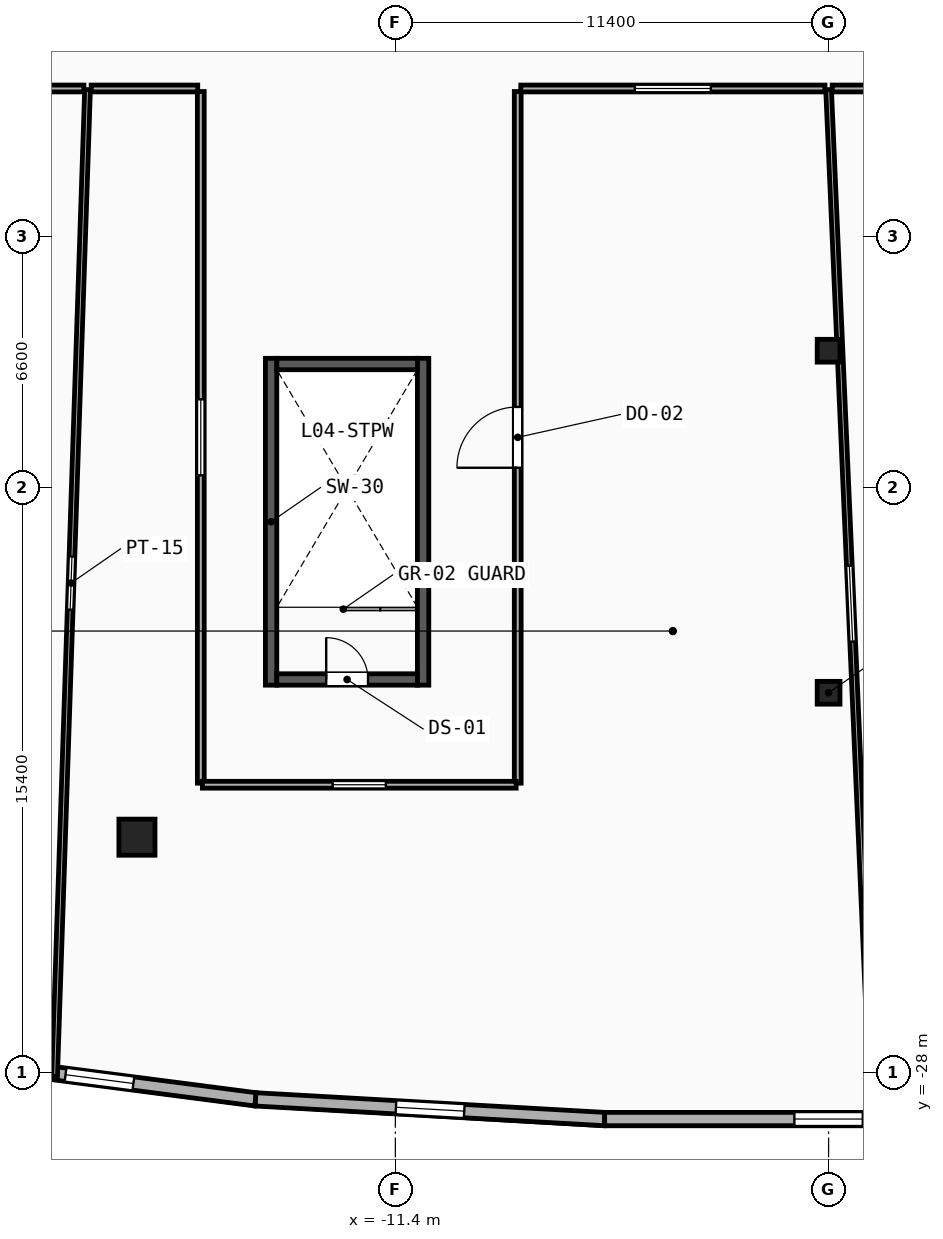
"""IFC4 building model, lengths in metres.
Left out: names, types, materials, properties, quantities, classifications, styles, units other than length and angle.
Written with IfcOpenShell. Run it as: python <this file> out.ifc"""

import sys

from ifc_helpers import new_model, si_unit, direction, frame, frame_2d, origin, origin_2d, place, context, subcontext, project, spatial, rectangle, hollow_rectangle, circle, extrude, element, fill, save


model = new_model("IFC4")
c1 = context("Model", 3, precision=1e-05, world=origin(), true_north=direction((0.0, 1.0)))
c2 = subcontext(c1, "Body", "Model", "MODEL_VIEW")
j1 = project(units=[si_unit("LENGTHUNIT", "METRE"), si_unit("PLANEANGLEUNIT", "RADIAN")], contexts=[c1])
p1 = place(None, origin())
s1 = spatial("IfcSite", under=j1, at=p1, CompositionType="ELEMENT")
p2 = place(p1, origin())
s2 = spatial("IfcBuilding", under=s1, at=p2, CompositionType="ELEMENT")
p3 = place(p2, frame((0.0, 0.0, 20.0)))
s3 = spatial("IfcBuildingStorey", under=s2, at=p3, CompositionType="ELEMENT", Elevation=20.0)
for number, where, z_axis, x_axis in (
    (1, (0.0, -18.0, 0.0), (0.0, 0.0, 1.0), (1.0, 0.0, 0.0)),
    (2, (0.0, -9.0, 0.0), (0.0, 0.0, 1.0), (1.0, 0.0, 0.0)),
):
    element("IfcColumn", number, at=place(p3, frame(where, z_axis=z_axis, x_axis=x_axis)), inside=s3, PredefinedType="COLUMN", context=c2, shape_type="SweptSolid", body=[
        extrude(hollow_rectangle(XDim=0.6, YDim=0.6, WallThickness=0.032, at=origin_2d()), origin(), (0.0, 0.0, 1.0), 3.695),
    ])
p4 = place(p3, frame((-18.2, -21.8, 0.0), z_axis=(0.0, 0.0, 1.0), x_axis=(1.0, 0.0, 0.0)))
e3 = element("IfcColumn", 3, at=p4, inside=s3, PredefinedType="PILASTER", context=c2, shape_type="SweptSolid", body=[
    extrude(circle(Radius=0.475, at=origin_2d()), origin(), (0.0, 0.0, 1.0), 3.695),
])
p5 = place(p3, frame((-23.293, -27.632, 0.0), z_axis=(0.0, 0.0, 1.0), x_axis=(0.99168663472, -0.128676410104, 0.0)))
e4 = element("IfcWall", 4, at=p5, inside=s3, PredefinedType="SOLIDWALL", context=c2, shape_type="SweptSolid", body=[
    extrude(rectangle(XDim=8.284, YDim=0.35, at=frame_2d((4.142, 0.0))), origin(), (0.0, 0.0, 1.0), 3.7),
])
p6 = place(p5, frame((3.242, 0.0, 0.45)))
e5 = element("IfcOpeningElement", 5, at=p6, cuts=e4, PredefinedType="OPENING", context=c2, shape_type="SweptSolid", body=[
    extrude(rectangle(XDim=1.8, YDim=2.4, at=frame_2d((0.9, 1.2))), frame((0.0, 0.185, 0.0), z_axis=(0.0, -1.0, 0.0), x_axis=(1.0, 0.0, 0.0)), (0.0, 0.0, 1.0), 0.37),
])
p7 = place(p3, frame((-15.079, -28.698, 0.0), z_axis=(0.0, 0.0, 1.0), x_axis=(0.998413463137, -0.056307695976, 0.0)))
e6 = element("IfcWall", 6, at=p7, inside=s3, PredefinedType="SOLIDWALL", context=c2, shape_type="SweptSolid", body=[
    extrude(rectangle(XDim=9.201, YDim=0.35, at=frame_2d((4.6, 0.0))), origin(), (0.0, 0.0, 1.0), 3.7),
])
p8 = place(p7, frame((3.7, 0.0, 0.45)))
e7 = element("IfcOpeningElement", 7, at=p8, cuts=e6, PredefinedType="OPENING", context=c2, shape_type="SweptSolid", body=[
    extrude(rectangle(XDim=1.8, YDim=2.4, at=frame_2d((0.9, 1.2))), frame((0.0, 0.185, 0.0), z_axis=(0.0, -1.0, 0.0), x_axis=(1.0, 0.0, 0.0)), (0.0, 0.0, 1.0), 0.37),
])
p9 = place(p3, frame((-5.893, -29.216, 0.0), z_axis=(0.0, 0.0, 1.0), x_axis=(1.0, 0.0, 0.0)))
e8 = element("IfcWall", 8, at=p9, inside=s3, PredefinedType="SOLIDWALL", context=c2, shape_type="SweptSolid", body=[
    extrude(rectangle(XDim=11.785, YDim=0.35, at=frame_2d((5.893, 0.0))), origin(), (0.0, 0.0, 1.0), 3.7),
])
p10 = place(p9, frame((4.992, 0.0, 0.45)))
e9 = element("IfcOpeningElement", 9, at=p10, cuts=e8, PredefinedType="OPENING", context=c2, shape_type="SweptSolid", body=[
    extrude(rectangle(XDim=1.8, YDim=2.4, at=frame_2d((0.9, 1.2))), frame((0.0, 0.185, 0.0), z_axis=(0.0, -1.0, 0.0), x_axis=(1.0, 0.0, 0.0)), (0.0, 0.0, 1.0), 0.37),
])
for number, where, z_axis, x_axis in (
    (10, (-14.67, -17.8, 0.0), (0.0, 0.0, 1.0), (0.0, 1.0, 0.0)),
    (11, (-10.67, -17.8, 0.0), (0.0, 0.0, 1.0), (0.0, 1.0, 0.0)),
):
    element("IfcWall", number, at=place(p3, frame(where, z_axis=z_axis, x_axis=x_axis)), inside=s3, PredefinedType="SHEAR", context=c2, shape_type="SweptSolid", body=[
        extrude(rectangle(XDim=8.6, YDim=0.3, at=frame_2d((4.3, 0.0))), origin(), (0.0, 0.0, 1.0), 3.7),
    ])
p11 = place(p3, frame((-14.52, -17.65, 0.0), z_axis=(0.0, 0.0, 1.0), x_axis=(1.0, 0.0, 0.0)))
e12 = element("IfcWall", 12, at=p11, inside=s3, PredefinedType="SHEAR", context=c2, shape_type="SweptSolid", body=[
    extrude(rectangle(XDim=3.7, YDim=0.3, at=frame_2d((1.85, 0.0))), origin(), (0.0, 0.0, 1.0), 3.7),
])
p12 = place(p11, frame((1.3, 0.0, 0.0)))
e13 = element("IfcOpeningElement", 13, at=p12, cuts=e12, PredefinedType="OPENING", context=c2, shape_type="SweptSolid", body=[
    extrude(rectangle(XDim=1.1, YDim=2.15, at=frame_2d((0.55, 1.075))), frame((0.0, 0.16, 0.0), z_axis=(0.0, -1.0, 0.0), x_axis=(1.0, 0.0, 0.0)), (0.0, 0.0, 1.0), 0.32),
])
p13 = place(p3, frame((-14.52, -9.35, 0.0), z_axis=(0.0, 0.0, 1.0), x_axis=(1.0, 0.0, 0.0)))
e14 = element("IfcWall", 14, at=p13, inside=s3, PredefinedType="SHEAR", context=c2, shape_type="SweptSolid", body=[
    extrude(rectangle(XDim=3.7, YDim=0.3, at=frame_2d((1.85, 0.0))), origin(), (0.0, 0.0, 1.0), 3.7),
])
p14 = place(p3, frame((-20.367, -28.098, 0.0), z_axis=(0.0, 0.0, 1.0), x_axis=(0.033375525231, 0.999442881968, 0.0)))
e15 = element("IfcWall", 15, at=p14, inside=s3, PredefinedType="PARTITIONING", context=c2, shape_type="SweptSolid", body=[
    extrude(rectangle(XDim=25.983, YDim=0.15, at=frame_2d((12.991, 0.0))), origin(), (0.0, 0.0, 1.0), 3.7),
])
p15 = place(p14, frame((12.291, 0.0, 1.05)))
e16 = element("IfcOpeningElement", 16, at=p15, cuts=e15, PredefinedType="OPENING", context=c2, shape_type="SweptSolid", body=[
    extrude(rectangle(XDim=1.4, YDim=1.5, at=frame_2d((0.7, 0.75))), frame((0.0, 0.085, 0.0), z_axis=(0.0, -1.0, 0.0), x_axis=(1.0, 0.0, 0.0)), (0.0, 0.0, 1.0), 0.17),
])
p16 = place(p3, frame((1.179, -29.18, 0.0), z_axis=(0.0, 0.0, 1.0), x_axis=(-0.043560875221, 0.999050774561, 0.0)))
e17 = element("IfcWall", 17, at=p16, inside=s3, PredefinedType="PARTITIONING", context=c2, shape_type="SweptSolid", body=[
    extrude(rectangle(XDim=27.076, YDim=0.15, at=frame_2d((13.538, 0.0))), origin(), (0.0, 0.0, 1.0), 2.922),
])
p17 = place(p16, frame((12.538, 0.0, 1.05)))
e18 = element("IfcOpeningElement", 18, at=p17, cuts=e17, PredefinedType="OPENING", context=c2, shape_type="SweptSolid", body=[
    extrude(rectangle(XDim=2.0, YDim=1.5, at=frame_2d((1.0, 0.75))), frame((0.0, 0.085, 0.0), z_axis=(0.0, -1.0, 0.0), x_axis=(1.0, 0.0, 0.0)), (0.0, 0.0, 1.0), 0.17),
])
p18 = place(p3, frame((-8.18, -20.378, 0.0), z_axis=(0.0, 0.0, 1.0), x_axis=(0.0, 1.0, 0.0)))
e19 = element("IfcWall", 19, at=p18, inside=s3, PredefinedType="PARTITIONING", context=c2, shape_type="SweptSolid", body=[
    extrude(rectangle(XDim=18.198, YDim=0.18, at=frame_2d((9.099, 0.0))), origin(), (0.0, 0.0, 1.0), 3.7),
])
p19 = place(p18, frame((8.299, 0.0, 0.0)))
e20 = element("IfcOpeningElement", 20, at=p19, cuts=e19, PredefinedType="OPENING", context=c2, shape_type="SweptSolid", body=[
    extrude(rectangle(XDim=1.6, YDim=2.2, at=frame_2d((0.8, 1.1))), frame((0.0, 0.1, 0.0), z_axis=(0.0, -1.0, 0.0), x_axis=(1.0, 0.0, 0.0)), (0.0, 0.0, 1.0), 0.2),
])
p20 = place(p3, frame((-16.52, -2.18, 0.0), z_axis=(0.0, 0.0, 1.0), x_axis=(0.0, -1.0, 0.0)))
e21 = element("IfcWall", 21, at=p20, inside=s3, PredefinedType="PARTITIONING", context=c2, shape_type="SweptSolid", body=[
    extrude(rectangle(XDim=18.198, YDim=0.18, at=frame_2d((9.099, 0.0))), origin(), (0.0, 0.0, 1.0), 3.7),
])
p21 = place(p20, frame((8.099, 0.0, 1.05)))
e22 = element("IfcOpeningElement", 22, at=p21, cuts=e21, PredefinedType="OPENING", context=c2, shape_type="SweptSolid", body=[
    extrude(rectangle(XDim=2.0, YDim=1.5, at=frame_2d((1.0, 0.75))), frame((0.0, 0.1, 0.0), z_axis=(0.0, -1.0, 0.0), x_axis=(1.0, 0.0, 0.0)), (0.0, 0.0, 1.0), 0.2),
])
p22 = place(p3, frame((-16.479, -20.42, 0.0), z_axis=(0.0, 0.0, 1.0), x_axis=(1.0, 0.0, 0.0)))
e23 = element("IfcWall", 23, at=p22, inside=s3, PredefinedType="PARTITIONING", context=c2, shape_type="SweptSolid", body=[
    extrude(rectangle(XDim=8.257, YDim=0.18, at=frame_2d((4.128, 0.0))), origin(), (0.0, 0.0, 1.0), 3.7),
])
p23 = place(p22, frame((3.428, 0.0, 1.05)))
e24 = element("IfcOpeningElement", 24, at=p23, cuts=e23, PredefinedType="OPENING", context=c2, shape_type="SweptSolid", body=[
    extrude(rectangle(XDim=1.4, YDim=1.5, at=frame_2d((0.7, 0.75))), frame((0.0, 0.1, 0.0), z_axis=(0.0, -1.0, 0.0), x_axis=(1.0, 0.0, 0.0)), (0.0, 0.0, 1.0), 0.2),
])
p24 = place(p3, frame((-8.1, -2.1, 0.0), z_axis=(0.0, 0.0, 1.0), x_axis=(1.0, 0.0, 0.0)))
e25 = element("IfcWall", 25, at=p24, inside=s3, PredefinedType="PARTITIONING", context=c2, shape_type="SweptSolid", body=[
    extrude(rectangle(XDim=8.005, YDim=0.18, at=frame_2d((4.002, 0.0))), origin(), (0.0, 0.0, 1.0), 3.7),
])
p25 = place(p24, frame((3.002, 0.0, 1.05)))
e26 = element("IfcOpeningElement", 26, at=p25, cuts=e25, PredefinedType="OPENING", context=c2, shape_type="SweptSolid", body=[
    extrude(rectangle(XDim=2.0, YDim=1.5, at=frame_2d((1.0, 0.75))), frame((0.0, 0.1, 0.0), z_axis=(0.0, -1.0, 0.0), x_axis=(1.0, 0.0, 0.0)), (0.0, 0.0, 1.0), 0.2),
])
p26 = place(p3, frame((-19.405, -2.1, 0.0), z_axis=(0.0, 0.0, 1.0), x_axis=(1.0, 0.0, 0.0)))
e27 = element("IfcWall", 27, at=p26, inside=s3, PredefinedType="PARTITIONING", context=c2, shape_type="SweptSolid", body=[
    extrude(rectangle(XDim=2.805, YDim=0.18, at=frame_2d((1.402, 0.0))), origin(), (0.0, 0.0, 1.0), 3.7),
])
p27 = place(p3, frame((0.095, -2.1, 0.0), z_axis=(0.0, 0.0, 1.0), x_axis=(1.0, 0.0, 0.0)))
e28 = element("IfcWall", 28, at=p27, inside=s3, PredefinedType="PARTITIONING", context=c2, shape_type="SweptSolid", body=[
    extrude(rectangle(XDim=16.945, YDim=0.18, at=frame_2d((8.473, 0.0))), origin(), (0.0, 0.0, 1.0), 2.922),
])
p28 = place(p27, frame((7.673, 0.0, 0.0)))
e29 = element("IfcOpeningElement", 29, at=p28, cuts=e28, PredefinedType="OPENING", context=c2, shape_type="SweptSolid", body=[
    extrude(rectangle(XDim=1.6, YDim=2.2, at=frame_2d((0.8, 1.1))), frame((0.0, 0.1, 0.0), z_axis=(0.0, -1.0, 0.0), x_axis=(1.0, 0.0, 0.0)), (0.0, 0.0, 1.0), 0.2),
])
p29 = place(p3, frame((-35.479, -2.1, 0.0), z_axis=(0.0, 0.0, 1.0), x_axis=(1.0, 0.0, 0.0)))
e30 = element("IfcWall", 30, at=p29, inside=s3, PredefinedType="PARTITIONING", context=c2, shape_type="SweptSolid", body=[
    extrude(rectangle(XDim=15.884, YDim=0.18, at=frame_2d((7.942, 0.0))), origin(), (0.0, 0.0, 1.0), 3.7),
])
p30 = place(p29, frame((7.142, 0.0, 0.0)))
e31 = element("IfcOpeningElement", 31, at=p30, cuts=e30, PredefinedType="OPENING", context=c2, shape_type="SweptSolid", body=[
    extrude(rectangle(XDim=1.6, YDim=2.2, at=frame_2d((0.8, 1.1))), frame((0.0, 0.1, 0.0), z_axis=(0.0, -1.0, 0.0), x_axis=(1.0, 0.0, 0.0)), (0.0, 0.0, 1.0), 0.2),
])
p31 = place(p6, origin())
e32 = element("IfcWindow", 32, at=p31, inside=s3, PartitioningType="SINGLE_PANEL", PredefinedType="WINDOW", context=c2, shape_type="SweptSolid", body=[
    extrude(rectangle(XDim=1.8, YDim=2.4, at=frame_2d((0.9, 1.2))), frame((0.0, 0.03, 0.0), z_axis=(0.0, -1.0, 0.0), x_axis=(1.0, 0.0, 0.0)), (0.0, 0.0, 1.0), 0.06),
])
fill(e5, e32)
p32 = place(p8, origin())
e33 = element("IfcWindow", 33, at=p32, inside=s3, PartitioningType="SINGLE_PANEL", PredefinedType="WINDOW", context=c2, shape_type="SweptSolid", body=[
    extrude(rectangle(XDim=1.8, YDim=2.4, at=frame_2d((0.9, 1.2))), frame((0.0, 0.03, 0.0), z_axis=(0.0, -1.0, 0.0), x_axis=(1.0, 0.0, 0.0)), (0.0, 0.0, 1.0), 0.06),
])
fill(e7, e33)
p33 = place(p10, origin())
e34 = element("IfcWindow", 34, at=p33, inside=s3, PartitioningType="SINGLE_PANEL", PredefinedType="WINDOW", context=c2, shape_type="SweptSolid", body=[
    extrude(rectangle(XDim=1.8, YDim=2.4, at=frame_2d((0.9, 1.2))), frame((0.0, 0.03, 0.0), z_axis=(0.0, -1.0, 0.0), x_axis=(1.0, 0.0, 0.0)), (0.0, 0.0, 1.0), 0.06),
])
fill(e9, e34)
p34 = place(p12, origin())
e35 = element("IfcDoor", 35, at=p34, inside=s3, OperationType="SINGLE_SWING_LEFT", PredefinedType="DOOR", context=c2, shape_type="SweptSolid", body=[
    extrude(rectangle(XDim=1.1, YDim=2.15, at=frame_2d((0.55, 1.075))), frame((0.0, 0.025, 0.0), z_axis=(0.0, -1.0, 0.0), x_axis=(1.0, 0.0, 0.0)), (0.0, 0.0, 1.0), 0.05),
])
fill(e13, e35)
p35 = place(p19, origin())
e36 = element("IfcDoor", 36, at=p35, inside=s3, OperationType="SINGLE_SWING_LEFT", PredefinedType="DOOR", context=c2, shape_type="SweptSolid", body=[
    extrude(rectangle(XDim=1.6, YDim=2.2, at=frame_2d((0.8, 1.1))), frame((0.0, 0.025, 0.0), z_axis=(0.0, -1.0, 0.0), x_axis=(1.0, 0.0, 0.0)), (0.0, 0.0, 1.0), 0.05),
])
fill(e20, e36)
p36 = place(p15, origin())
e37 = element("IfcWindow", 37, at=p36, inside=s3, PartitioningType="SINGLE_PANEL", PredefinedType="WINDOW", context=c2, shape_type="SweptSolid", body=[
    extrude(rectangle(XDim=1.4, YDim=1.5, at=frame_2d((0.7, 0.75))), frame((0.0, 0.03, 0.0), z_axis=(0.0, -1.0, 0.0), x_axis=(1.0, 0.0, 0.0)), (0.0, 0.0, 1.0), 0.06),
])
fill(e16, e37)
p37 = place(p17, origin())
e38 = element("IfcWindow", 38, at=p37, inside=s3, PartitioningType="SINGLE_PANEL", PredefinedType="WINDOW", context=c2, shape_type="SweptSolid", body=[
    extrude(rectangle(XDim=2.0, YDim=1.5, at=frame_2d((1.0, 0.75))), frame((0.0, 0.03, 0.0), z_axis=(0.0, -1.0, 0.0), x_axis=(1.0, 0.0, 0.0)), (0.0, 0.0, 1.0), 0.06),
])
fill(e18, e38)
p38 = place(p21, origin())
e39 = element("IfcWindow", 39, at=p38, inside=s3, PartitioningType="SINGLE_PANEL", PredefinedType="WINDOW", context=c2, shape_type="SweptSolid", body=[
    extrude(rectangle(XDim=2.0, YDim=1.5, at=frame_2d((1.0, 0.75))), frame((0.0, 0.03, 0.0), z_axis=(0.0, -1.0, 0.0), x_axis=(1.0, 0.0, 0.0)), (0.0, 0.0, 1.0), 0.06),
])
fill(e22, e39)
p39 = place(p23, origin())
e40 = element("IfcWindow", 40, at=p39, inside=s3, PartitioningType="SINGLE_PANEL", PredefinedType="WINDOW", context=c2, shape_type="SweptSolid", body=[
    extrude(rectangle(XDim=1.4, YDim=1.5, at=frame_2d((0.7, 0.75))), frame((0.0, 0.03, 0.0), z_axis=(0.0, -1.0, 0.0), x_axis=(1.0, 0.0, 0.0)), (0.0, 0.0, 1.0), 0.06),
])
fill(e24, e40)
p40 = place(p25, origin())
e41 = element("IfcWindow", 41, at=p40, inside=s3, PartitioningType="SINGLE_PANEL", PredefinedType="WINDOW", context=c2, shape_type="SweptSolid", body=[
    extrude(rectangle(XDim=2.0, YDim=1.5, at=frame_2d((1.0, 0.75))), frame((0.0, 0.03, 0.0), z_axis=(0.0, -1.0, 0.0), x_axis=(1.0, 0.0, 0.0)), (0.0, 0.0, 1.0), 0.06),
])
fill(e26, e41)
save(model, sys.argv[1])
